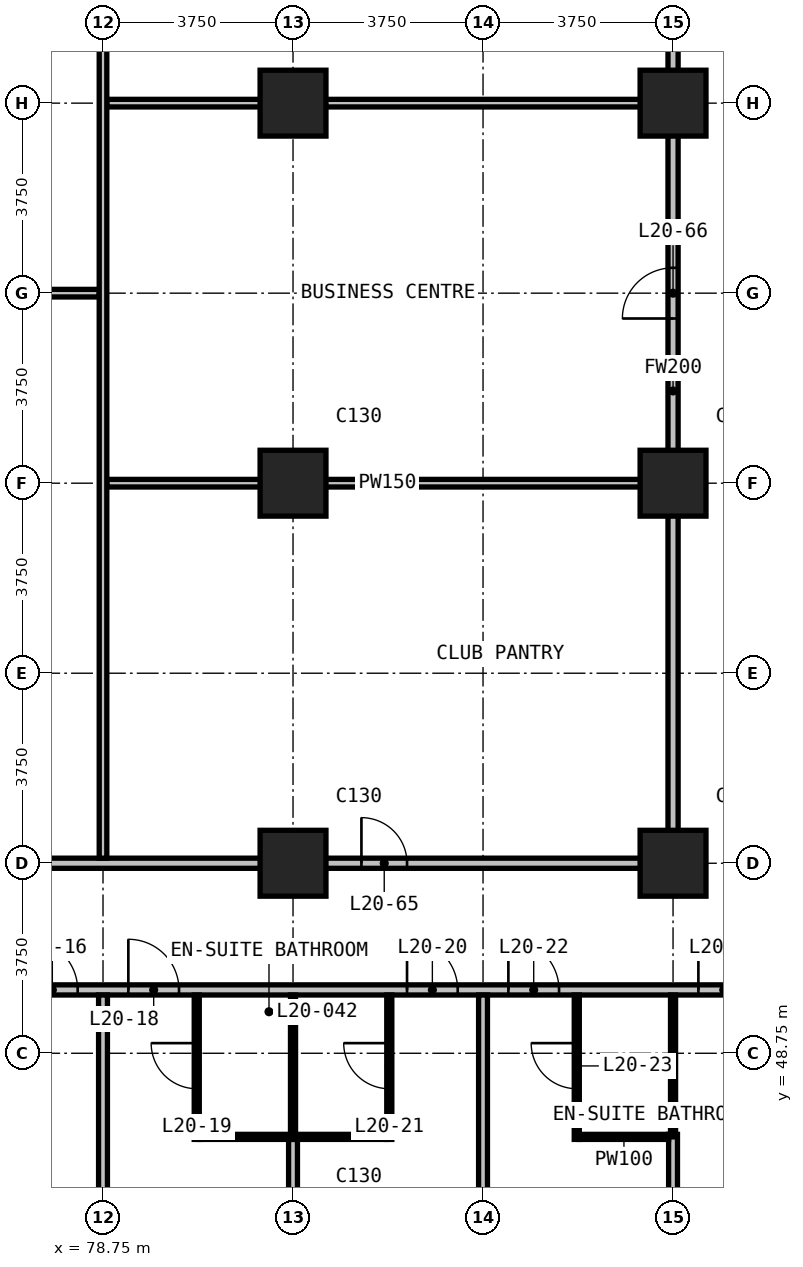
"""IFC4 building model, lengths in metres.
Left out: names, types, materials, properties, quantities, classifications, styles, units other than length and angle.
Written with IfcOpenShell. Run it as: python <this file> out.ifc"""

import sys

from ifc_helpers import new_model, si_unit, direction, frame, frame_2d, origin, origin_2d, place, context, subcontext, project, spatial, rectangle, extrude, element, fill, save


model = new_model("IFC4")
c1 = context("Model", 3, precision=1e-05, world=origin(), true_north=direction((0.0, 1.0)))
c2 = subcontext(c1, "Body", "Model", "MODEL_VIEW")
j1 = project(units=[si_unit("LENGTHUNIT", "METRE"), si_unit("PLANEANGLEUNIT", "RADIAN")], contexts=[c1])
p1 = place(None, origin())
s1 = spatial("IfcSite", under=j1, at=p1, CompositionType="ELEMENT")
p2 = place(p1, origin())
s2 = spatial("IfcBuilding", under=s1, at=p2, CompositionType="ELEMENT")
p3 = place(p2, frame((0.0, 0.0, 85.7)))
s3 = spatial("IfcBuildingStorey", under=s2, at=p3, CompositionType="ELEMENT", Elevation=85.7)
for number, where, z_axis, x_axis in (
    (1, (82.5, 52.5, 0.0), (0.0, 0.0, 1.0), (1.0, 0.0, 0.0)),
    (2, (82.5, 60.0, 0.0), (0.0, 0.0, 1.0), (1.0, 0.0, 0.0)),
    (3, (82.5, 67.5, 0.0), (0.0, 0.0, 1.0), (1.0, 0.0, 0.0)),
    (4, (90.0, 52.5, 0.0), (0.0, 0.0, 1.0), (1.0, 0.0, 0.0)),
    (5, (90.0, 60.0, 0.0), (0.0, 0.0, 1.0), (1.0, 0.0, 0.0)),
    (6, (90.0, 67.5, 0.0), (0.0, 0.0, 1.0), (1.0, 0.0, 0.0)),
):
    element("IfcColumn", number, at=place(p3, frame(where, z_axis=z_axis, x_axis=x_axis)), inside=s3, PredefinedType="COLUMN", context=c2, shape_type="SweptSolid", body=[
        extrude(rectangle(XDim=1.3, YDim=1.3, at=origin_2d()), origin(), (0.0, 0.0, 1.0), 3.3),
    ])
p4 = place(p3, frame((51.735, 50.0, 0.0), z_axis=(0.0, 0.0, 1.0), x_axis=(1.0, 0.0, 0.0)))
e7 = element("IfcWall", 7, at=p4, inside=s3, PredefinedType="PARTITIONING", context=c2, shape_type="SweptSolid", body=[
    extrude(rectangle(XDim=46.53, YDim=0.2, at=frame_2d((23.265, 0.0))), origin(), (0.0, 0.0, 1.0), 3.0),
])
p5 = place(p4, frame((6.765, 0.0, 0.0)))
e8 = element("IfcOpeningElement", 8, at=p5, cuts=e7, PredefinedType="OPENING", context=c2, shape_type="SweptSolid", body=[
    extrude(rectangle(XDim=1.0, YDim=2.2, at=frame_2d((0.5, 1.1))), frame((0.0, 0.11, 0.0), z_axis=(0.0, -1.0, 0.0), x_axis=(1.0, 0.0, 0.0)), (0.0, 0.0, 1.0), 0.22),
])
p6 = place(p4, frame((10.515, 0.0, 0.0)))
e9 = element("IfcOpeningElement", 9, at=p6, cuts=e7, PredefinedType="OPENING", context=c2, shape_type="SweptSolid", body=[
    extrude(rectangle(XDim=1.0, YDim=2.2, at=frame_2d((0.5, 1.1))), frame((0.0, 0.11, 0.0), z_axis=(0.0, -1.0, 0.0), x_axis=(1.0, 0.0, 0.0)), (0.0, 0.0, 1.0), 0.22),
])
p7 = place(p4, frame((12.515, 0.0, 0.0)))
e10 = element("IfcOpeningElement", 10, at=p7, cuts=e7, PredefinedType="OPENING", context=c2, shape_type="SweptSolid", body=[
    extrude(rectangle(XDim=1.0, YDim=2.2, at=frame_2d((0.5, 1.1))), frame((0.0, 0.11, 0.0), z_axis=(0.0, -1.0, 0.0), x_axis=(1.0, 0.0, 0.0)), (0.0, 0.0, 1.0), 0.22),
])
p8 = place(p4, frame((18.015, 0.0, 0.0)))
e11 = element("IfcOpeningElement", 11, at=p8, cuts=e7, PredefinedType="OPENING", context=c2, shape_type="SweptSolid", body=[
    extrude(rectangle(XDim=1.0, YDim=2.2, at=frame_2d((0.5, 1.1))), frame((0.0, 0.11, 0.0), z_axis=(0.0, -1.0, 0.0), x_axis=(1.0, 0.0, 0.0)), (0.0, 0.0, 1.0), 0.22),
])
p9 = place(p4, frame((20.015, 0.0, 0.0)))
e12 = element("IfcOpeningElement", 12, at=p9, cuts=e7, PredefinedType="OPENING", context=c2, shape_type="SweptSolid", body=[
    extrude(rectangle(XDim=1.0, YDim=2.2, at=frame_2d((0.5, 1.1))), frame((0.0, 0.11, 0.0), z_axis=(0.0, -1.0, 0.0), x_axis=(1.0, 0.0, 0.0)), (0.0, 0.0, 1.0), 0.22),
])
p10 = place(p4, frame((25.515, 0.0, 0.0)))
e13 = element("IfcOpeningElement", 13, at=p10, cuts=e7, PredefinedType="OPENING", context=c2, shape_type="SweptSolid", body=[
    extrude(rectangle(XDim=1.0, YDim=2.2, at=frame_2d((0.5, 1.1))), frame((0.0, 0.11, 0.0), z_axis=(0.0, -1.0, 0.0), x_axis=(1.0, 0.0, 0.0)), (0.0, 0.0, 1.0), 0.22),
])
p11 = place(p4, frame((27.515, 0.0, 0.0)))
e14 = element("IfcOpeningElement", 14, at=p11, cuts=e7, PredefinedType="OPENING", context=c2, shape_type="SweptSolid", body=[
    extrude(rectangle(XDim=1.0, YDim=2.2, at=frame_2d((0.5, 1.1))), frame((0.0, 0.11, 0.0), z_axis=(0.0, -1.0, 0.0), x_axis=(1.0, 0.0, 0.0)), (0.0, 0.0, 1.0), 0.22),
])
p12 = place(p4, frame((33.015, 0.0, 0.0)))
e15 = element("IfcOpeningElement", 15, at=p12, cuts=e7, PredefinedType="OPENING", context=c2, shape_type="SweptSolid", body=[
    extrude(rectangle(XDim=1.0, YDim=2.2, at=frame_2d((0.5, 1.1))), frame((0.0, 0.11, 0.0), z_axis=(0.0, -1.0, 0.0), x_axis=(1.0, 0.0, 0.0)), (0.0, 0.0, 1.0), 0.22),
])
p13 = place(p4, frame((35.015, 0.0, 0.0)))
e16 = element("IfcOpeningElement", 16, at=p13, cuts=e7, PredefinedType="OPENING", context=c2, shape_type="SweptSolid", body=[
    extrude(rectangle(XDim=1.0, YDim=2.2, at=frame_2d((0.5, 1.1))), frame((0.0, 0.11, 0.0), z_axis=(0.0, -1.0, 0.0), x_axis=(1.0, 0.0, 0.0)), (0.0, 0.0, 1.0), 0.22),
])
p14 = place(p4, frame((38.765, 0.0, 0.0)))
e17 = element("IfcOpeningElement", 17, at=p14, cuts=e7, PredefinedType="OPENING", context=c2, shape_type="SweptSolid", body=[
    extrude(rectangle(XDim=1.0, YDim=2.2, at=frame_2d((0.5, 1.1))), frame((0.0, 0.11, 0.0), z_axis=(0.0, -1.0, 0.0), x_axis=(1.0, 0.0, 0.0)), (0.0, 0.0, 1.0), 0.22),
])
p15 = place(p4, frame((1.8, 0.0, 0.0)))
e18 = element("IfcOpeningElement", 18, at=p15, cuts=e7, PredefinedType="OPENING", context=c2, shape_type="SweptSolid", body=[
    extrude(rectangle(XDim=0.9, YDim=2.2, at=frame_2d((0.45, 1.1))), frame((0.0, 0.11, 0.0), z_axis=(0.0, -1.0, 0.0), x_axis=(1.0, 0.0, 0.0)), (0.0, 0.0, 1.0), 0.22),
])
p16 = place(p4, frame((43.815, 0.0, 0.0)))
e19 = element("IfcOpeningElement", 19, at=p16, cuts=e7, PredefinedType="OPENING", context=c2, shape_type="SweptSolid", body=[
    extrude(rectangle(XDim=0.9, YDim=2.2, at=frame_2d((0.45, 1.1))), frame((0.0, 0.11, 0.0), z_axis=(0.0, -1.0, 0.0), x_axis=(1.0, 0.0, 0.0)), (0.0, 0.0, 1.0), 0.22),
])
p17 = place(p3, frame((60.1, 52.5, 0.0), z_axis=(0.0, 0.0, 1.0), x_axis=(1.0, 0.0, 0.0)))
e20 = element("IfcWall", 20, at=p17, inside=s3, PredefinedType="PARTITIONING", context=c2, shape_type="SweptSolid", body=[
    extrude(rectangle(XDim=29.8, YDim=0.2, at=frame_2d((14.9, 0.0))), origin(), (0.0, 0.0, 1.0), 3.0),
])
p18 = place(p17, frame((8.4, 0.0, 0.0)))
e21 = element("IfcOpeningElement", 21, at=p18, cuts=e20, PredefinedType="OPENING", context=c2, shape_type="SweptSolid", body=[
    extrude(rectangle(XDim=1.8, YDim=2.2, at=frame_2d((0.9, 1.1))), frame((0.0, 0.11, 0.0), z_axis=(0.0, -1.0, 0.0), x_axis=(1.0, 0.0, 0.0)), (0.0, 0.0, 1.0), 0.22),
])
p19 = place(p17, frame((23.75, 0.0, 0.0)))
e22 = element("IfcOpeningElement", 22, at=p19, cuts=e20, PredefinedType="OPENING", context=c2, shape_type="SweptSolid", body=[
    extrude(rectangle(XDim=0.9, YDim=2.2, at=frame_2d((0.45, 1.1))), frame((0.0, 0.11, 0.0), z_axis=(0.0, -1.0, 0.0), x_axis=(1.0, 0.0, 0.0)), (0.0, 0.0, 1.0), 0.22),
])
p20 = place(p3, frame((90.0, 52.4, 0.0), z_axis=(0.0, 0.0, 1.0), x_axis=(0.0, 1.0, 0.0)))
e23 = element("IfcWall", 23, at=p20, inside=s3, PredefinedType="PARTITIONING", context=c2, shape_type="SweptSolid", body=[
    extrude(rectangle(XDim=18.84, YDim=0.2, at=frame_2d((9.42, 0.0))), origin(), (0.0, 0.0, 1.0), 3.0),
])
p21 = place(p20, frame((10.85, 0.0, 0.0)))
e24 = element("IfcOpeningElement", 24, at=p21, cuts=e23, PredefinedType="OPENING", context=c2, shape_type="SweptSolid", body=[
    extrude(rectangle(XDim=1.0, YDim=2.2, at=frame_2d((0.5, 1.1))), frame((0.0, 0.11, 0.0), z_axis=(0.0, -1.0, 0.0), x_axis=(1.0, 0.0, 0.0)), (0.0, 0.0, 1.0), 0.22),
])
p22 = place(p20, frame((16.5, 0.0, 0.0)))
e25 = element("IfcOpeningElement", 25, at=p22, cuts=e23, PredefinedType="OPENING", context=c2, shape_type="SweptSolid", body=[
    extrude(rectangle(XDim=0.9, YDim=2.2, at=frame_2d((0.45, 1.1))), frame((0.0, 0.11, 0.0), z_axis=(0.0, -1.0, 0.0), x_axis=(1.0, 0.0, 0.0)), (0.0, 0.0, 1.0), 0.22),
])
p23 = place(p3, frame((78.75, 40.54, 0.0), z_axis=(0.0, 0.0, 1.0), x_axis=(0.0, 1.0, 0.0)))
e26 = element("IfcWall", 26, at=p23, inside=s3, PredefinedType="PARTITIONING", context=c2, shape_type="SweptSolid", body=[
    extrude(rectangle(XDim=9.36, YDim=0.175, at=frame_2d((4.68, 0.0))), origin(), (0.0, 0.0, 1.0), 3.0),
])
p24 = place(p3, frame((82.5, 40.54, 0.0), z_axis=(0.0, 0.0, 1.0), x_axis=(0.0, 1.0, 0.0)))
e27 = element("IfcWall", 27, at=p24, inside=s3, PredefinedType="PARTITIONING", context=c2, shape_type="SweptSolid", body=[
    extrude(rectangle(XDim=6.51, YDim=0.175, at=frame_2d((3.255, 0.0))), origin(), (0.0, 0.0, 1.0), 3.0),
])
p25 = place(p3, frame((86.25, 40.54, 0.0), z_axis=(0.0, 0.0, 1.0), x_axis=(0.0, 1.0, 0.0)))
e28 = element("IfcWall", 28, at=p25, inside=s3, PredefinedType="PARTITIONING", context=c2, shape_type="SweptSolid", body=[
    extrude(rectangle(XDim=9.36, YDim=0.175, at=frame_2d((4.68, 0.0))), origin(), (0.0, 0.0, 1.0), 3.0),
])
p26 = place(p3, frame((90.0, 40.485, 0.0), z_axis=(0.0, 0.0, 1.0), x_axis=(0.0, 1.0, 0.0)))
e29 = element("IfcWall", 29, at=p26, inside=s3, PredefinedType="PARTITIONING", context=c2, shape_type="SweptSolid", body=[
    extrude(rectangle(XDim=6.665, YDim=0.175, at=frame_2d((3.333, 0.0))), origin(), (0.0, 0.0, 1.0), 3.0),
])
p27 = place(p3, frame((78.825, 60.0, 0.0), z_axis=(0.0, 0.0, 1.0), x_axis=(1.0, 0.0, 0.0)))
e30 = element("IfcWall", 30, at=p27, inside=s3, PredefinedType="PARTITIONING", context=c2, shape_type="SweptSolid", body=[
    extrude(rectangle(XDim=11.075, YDim=0.15, at=frame_2d((5.538, 0.0))), origin(), (0.0, 0.0, 1.0), 3.0),
])
p28 = place(p3, frame((60.1, 63.75, 0.0), z_axis=(0.0, 0.0, 1.0), x_axis=(1.0, 0.0, 0.0)))
e31 = element("IfcWall", 31, at=p28, inside=s3, PredefinedType="PARTITIONING", context=c2, shape_type="SweptSolid", body=[
    extrude(rectangle(XDim=18.575, YDim=0.15, at=frame_2d((9.288, 0.0))), origin(), (0.0, 0.0, 1.0), 3.0),
])
p29 = place(p3, frame((78.825, 67.5, 0.0), z_axis=(0.0, 0.0, 1.0), x_axis=(1.0, 0.0, 0.0)))
e32 = element("IfcWall", 32, at=p29, inside=s3, PredefinedType="PARTITIONING", context=c2, shape_type="SweptSolid", body=[
    extrude(rectangle(XDim=11.075, YDim=0.15, at=frame_2d((5.538, 0.0))), origin(), (0.0, 0.0, 1.0), 3.0),
])
p30 = place(p3, frame((78.75, 52.6, 0.0), z_axis=(0.0, 0.0, 1.0), x_axis=(0.0, 1.0, 0.0)))
e33 = element("IfcWall", 33, at=p30, inside=s3, PredefinedType="PARTITIONING", context=c2, shape_type="SweptSolid", body=[
    extrude(rectangle(XDim=18.64, YDim=0.15, at=frame_2d((9.32, 0.0))), origin(), (0.0, 0.0, 1.0), 3.0),
])
p31 = place(p3, frame((80.65, 47.1, 0.0), z_axis=(0.0, 0.0, 1.0), x_axis=(1.0, 0.0, 0.0)))
e34 = element("IfcWall", 34, at=p31, inside=s3, PredefinedType="PARTITIONING", context=c2, shape_type="SweptSolid", body=[
    extrude(rectangle(XDim=3.7, YDim=0.1, at=frame_2d((1.85, 0.0))), origin(), (0.0, 0.0, 1.0), 3.0),
])
p32 = place(p3, frame((88.15, 47.1, 0.0), z_axis=(0.0, 0.0, 1.0), x_axis=(1.0, 0.0, 0.0)))
e35 = element("IfcWall", 35, at=p32, inside=s3, PredefinedType="PARTITIONING", context=c2, shape_type="SweptSolid", body=[
    extrude(rectangle(XDim=1.762, YDim=0.1, at=frame_2d((0.881, 0.0))), origin(), (0.0, 0.0, 1.0), 3.0),
])
p33 = place(p3, frame((80.6, 47.05, 0.0), z_axis=(0.0, 0.0, 1.0), x_axis=(0.0, 1.0, 0.0)))
e36 = element("IfcWall", 36, at=p33, inside=s3, PredefinedType="PARTITIONING", context=c2, shape_type="SweptSolid", body=[
    extrude(rectangle(XDim=2.85, YDim=0.1, at=frame_2d((1.425, 0.0))), origin(), (0.0, 0.0, 1.0), 3.0),
])
p34 = place(p33, frame((1.0, 0.0, 0.0)))
e37 = element("IfcOpeningElement", 37, at=p34, cuts=e36, PredefinedType="OPENING", context=c2, shape_type="SweptSolid", body=[
    extrude(rectangle(XDim=0.9, YDim=2.2, at=frame_2d((0.45, 1.1))), frame((0.0, 0.06, 0.0), z_axis=(0.0, -1.0, 0.0), x_axis=(1.0, 0.0, 0.0)), (0.0, 0.0, 1.0), 0.12),
])
p35 = place(p3, frame((82.5, 47.15, 0.0), z_axis=(0.0, 0.0, 1.0), x_axis=(0.0, 1.0, 0.0)))
e38 = element("IfcWall", 38, at=p35, inside=s3, PredefinedType="PARTITIONING", context=c2, shape_type="SweptSolid", body=[
    extrude(rectangle(XDim=2.75, YDim=0.1, at=frame_2d((1.375, 0.0))), origin(), (0.0, 0.0, 1.0), 3.0),
])
p36 = place(p3, frame((84.4, 47.05, 0.0), z_axis=(0.0, 0.0, 1.0), x_axis=(0.0, 1.0, 0.0)))
e39 = element("IfcWall", 39, at=p36, inside=s3, PredefinedType="PARTITIONING", context=c2, shape_type="SweptSolid", body=[
    extrude(rectangle(XDim=2.85, YDim=0.1, at=frame_2d((1.425, 0.0))), origin(), (0.0, 0.0, 1.0), 3.0),
])
p37 = place(p36, frame((1.0, 0.0, 0.0)))
e40 = element("IfcOpeningElement", 40, at=p37, cuts=e39, PredefinedType="OPENING", context=c2, shape_type="SweptSolid", body=[
    extrude(rectangle(XDim=0.9, YDim=2.2, at=frame_2d((0.45, 1.1))), frame((0.0, 0.06, 0.0), z_axis=(0.0, -1.0, 0.0), x_axis=(1.0, 0.0, 0.0)), (0.0, 0.0, 1.0), 0.12),
])
p38 = place(p3, frame((88.1, 47.05, 0.0), z_axis=(0.0, 0.0, 1.0), x_axis=(0.0, 1.0, 0.0)))
e41 = element("IfcWall", 41, at=p38, inside=s3, PredefinedType="PARTITIONING", context=c2, shape_type="SweptSolid", body=[
    extrude(rectangle(XDim=2.85, YDim=0.1, at=frame_2d((1.425, 0.0))), origin(), (0.0, 0.0, 1.0), 3.0),
])
p39 = place(p38, frame((1.0, 0.0, 0.0)))
e42 = element("IfcOpeningElement", 42, at=p39, cuts=e41, PredefinedType="OPENING", context=c2, shape_type="SweptSolid", body=[
    extrude(rectangle(XDim=0.9, YDim=2.2, at=frame_2d((0.45, 1.1))), frame((0.0, 0.06, 0.0), z_axis=(0.0, -1.0, 0.0), x_axis=(1.0, 0.0, 0.0)), (0.0, 0.0, 1.0), 0.12),
])
p40 = place(p3, frame((90.0, 47.1, 0.0), z_axis=(0.0, 0.0, 1.0), x_axis=(0.0, 1.0, 0.0)))
e43 = element("IfcWall", 43, at=p40, inside=s3, PredefinedType="PARTITIONING", context=c2, shape_type="SweptSolid", body=[
    extrude(rectangle(XDim=2.8, YDim=0.1, at=frame_2d((1.4, 0.0))), origin(), (0.0, 0.0, 1.0), 3.0),
])
p41 = place(p10, origin())
e44 = element("IfcDoor", 44, at=p41, inside=s3, OperationType="SINGLE_SWING_RIGHT", PredefinedType="DOOR", context=c2, shape_type="SweptSolid", body=[
    extrude(rectangle(XDim=1.0, YDim=2.2, at=frame_2d((0.5, 1.1))), frame((0.0, 0.025, 0.0), z_axis=(0.0, -1.0, 0.0), x_axis=(1.0, 0.0, 0.0)), (0.0, 0.0, 1.0), 0.05),
])
fill(e13, e44)
p42 = place(p11, origin())
e45 = element("IfcDoor", 45, at=p42, inside=s3, OperationType="SINGLE_SWING_LEFT", PredefinedType="DOOR", context=c2, shape_type="SweptSolid", body=[
    extrude(rectangle(XDim=1.0, YDim=2.2, at=frame_2d((0.5, 1.1))), frame((0.0, 0.025, 0.0), z_axis=(0.0, -1.0, 0.0), x_axis=(1.0, 0.0, 0.0)), (0.0, 0.0, 1.0), 0.05),
])
fill(e14, e45)
p43 = place(p34, origin())
e46 = element("IfcDoor", 46, at=p43, inside=s3, OperationType="SINGLE_SWING_RIGHT", PredefinedType="DOOR", context=c2, shape_type="SweptSolid", body=[
    extrude(rectangle(XDim=0.9, YDim=2.2, at=frame_2d((0.45, 1.1))), frame((0.0, 0.025, 0.0), z_axis=(0.0, -1.0, 0.0), x_axis=(1.0, 0.0, 0.0)), (0.0, 0.0, 1.0), 0.05),
])
fill(e37, e46)
p44 = place(p12, origin())
e47 = element("IfcDoor", 47, at=p44, inside=s3, OperationType="SINGLE_SWING_RIGHT", PredefinedType="DOOR", context=c2, shape_type="SweptSolid", body=[
    extrude(rectangle(XDim=1.0, YDim=2.2, at=frame_2d((0.5, 1.1))), frame((0.0, 0.025, 0.0), z_axis=(0.0, -1.0, 0.0), x_axis=(1.0, 0.0, 0.0)), (0.0, 0.0, 1.0), 0.05),
])
fill(e15, e47)
p45 = place(p37, origin())
e48 = element("IfcDoor", 48, at=p45, inside=s3, OperationType="SINGLE_SWING_RIGHT", PredefinedType="DOOR", context=c2, shape_type="SweptSolid", body=[
    extrude(rectangle(XDim=0.9, YDim=2.2, at=frame_2d((0.45, 1.1))), frame((0.0, 0.025, 0.0), z_axis=(0.0, -1.0, 0.0), x_axis=(1.0, 0.0, 0.0)), (0.0, 0.0, 1.0), 0.05),
])
fill(e40, e48)
p46 = place(p13, origin())
e49 = element("IfcDoor", 49, at=p46, inside=s3, OperationType="SINGLE_SWING_LEFT", PredefinedType="DOOR", context=c2, shape_type="SweptSolid", body=[
    extrude(rectangle(XDim=1.0, YDim=2.2, at=frame_2d((0.5, 1.1))), frame((0.0, 0.025, 0.0), z_axis=(0.0, -1.0, 0.0), x_axis=(1.0, 0.0, 0.0)), (0.0, 0.0, 1.0), 0.05),
])
fill(e16, e49)
p47 = place(p39, origin())
e50 = element("IfcDoor", 50, at=p47, inside=s3, OperationType="SINGLE_SWING_RIGHT", PredefinedType="DOOR", context=c2, shape_type="SweptSolid", body=[
    extrude(rectangle(XDim=0.9, YDim=2.2, at=frame_2d((0.45, 1.1))), frame((0.0, 0.025, 0.0), z_axis=(0.0, -1.0, 0.0), x_axis=(1.0, 0.0, 0.0)), (0.0, 0.0, 1.0), 0.05),
])
fill(e42, e50)
p48 = place(p14, origin())
e51 = element("IfcDoor", 51, at=p48, inside=s3, OperationType="SINGLE_SWING_LEFT", PredefinedType="DOOR", context=c2, shape_type="SweptSolid", body=[
    extrude(rectangle(XDim=1.0, YDim=2.2, at=frame_2d((0.5, 1.1))), frame((0.0, 0.025, 0.0), z_axis=(0.0, -1.0, 0.0), x_axis=(1.0, 0.0, 0.0)), (0.0, 0.0, 1.0), 0.05),
])
fill(e17, e51)
p49 = place(p19, origin())
e52 = element("IfcDoor", 52, at=p49, inside=s3, OperationType="SINGLE_SWING_RIGHT", PredefinedType="DOOR", context=c2, shape_type="SweptSolid", body=[
    extrude(rectangle(XDim=0.9, YDim=2.2, at=frame_2d((0.45, 1.1))), frame((0.0, 0.025, 0.0), z_axis=(0.0, -1.0, 0.0), x_axis=(1.0, 0.0, 0.0)), (0.0, 0.0, 1.0), 0.05),
])
fill(e22, e52)
p50 = place(p21, origin())
e53 = element("IfcDoor", 53, at=p50, inside=s3, OperationType="SINGLE_SWING_LEFT", PredefinedType="DOOR", context=c2, shape_type="SweptSolid", body=[
    extrude(rectangle(XDim=1.0, YDim=2.2, at=frame_2d((0.5, 1.1))), frame((0.0, 0.025, 0.0), z_axis=(0.0, -1.0, 0.0), x_axis=(1.0, 0.0, 0.0)), (0.0, 0.0, 1.0), 0.05),
])
fill(e24, e53)
save(model, sys.argv[1])
